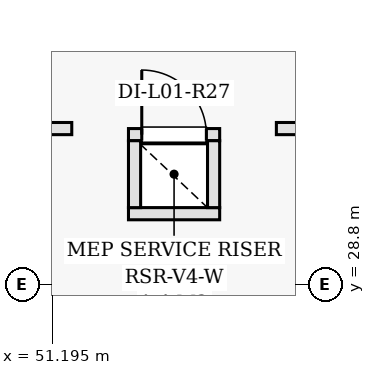
"""IFC4 building model, lengths in metres.
Left out: names, types, materials, properties, quantities, classifications, styles, units other than length and angle.
Written with IfcOpenShell. Run it as: python <this file> out.ifc"""

import sys

from ifc_helpers import new_model, si_unit, direction, frame, frame_2d, origin, place, context, subcontext, project, spatial, rectangle, extrude, element, fill, save


model = new_model("IFC4")
c1 = context("Model", 3, precision=1e-05, world=origin(), true_north=direction((0.0, 1.0)))
c2 = subcontext(c1, "Body", "Model", "MODEL_VIEW")
j1 = project(units=[si_unit("LENGTHUNIT", "METRE"), si_unit("PLANEANGLEUNIT", "RADIAN")], contexts=[c1])
p1 = place(None, origin())
s1 = spatial("IfcSite", under=j1, at=p1, CompositionType="ELEMENT")
p2 = place(p1, origin())
s2 = spatial("IfcBuilding", under=s1, at=p2, CompositionType="ELEMENT")
p3 = place(p2, frame((0.0, 0.0, 4.8)))
s3 = spatial("IfcBuildingStorey", under=s2, at=p3, CompositionType="ELEMENT", Elevation=4.8)
p4 = place(p3, frame((52.2, 29.73, 0.0), z_axis=(0.0, 0.0, 1.0), x_axis=(1.0, 0.0, 0.0)))
e1 = element("IfcWall", 1, at=p4, inside=s3, PredefinedType="PARTITIONING", context=c2, shape_type="SweptSolid", body=[
    extrude(rectangle(XDim=1.2, YDim=0.16, at=frame_2d((0.6, 0.0))), origin(), (0.0, 0.0, 1.0), 4.58),
])
p5 = place(p3, frame((52.2, 30.77, 0.0), z_axis=(0.0, 0.0, 1.0), x_axis=(1.0, 0.0, 0.0)))
e2 = element("IfcWall", 2, at=p5, inside=s3, PredefinedType="PARTITIONING", context=c2, shape_type="SweptSolid", body=[
    extrude(rectangle(XDim=1.2, YDim=0.16, at=frame_2d((0.6, 0.0))), origin(), (0.0, 0.0, 1.0), 4.58),
])
p6 = place(p5, frame((0.175, 0.0, 0.0)))
e3 = element("IfcOpeningElement", 3, at=p6, cuts=e2, PredefinedType="OPENING", context=c2, shape_type="SweptSolid", body=[
    extrude(rectangle(XDim=0.85, YDim=2.02, at=frame_2d((0.425, 1.01))), frame((0.0, 0.09, 0.0), z_axis=(0.0, -1.0, 0.0), x_axis=(1.0, 0.0, 0.0)), (0.0, 0.0, 1.0), 0.18),
])
for number, where, z_axis, x_axis in (
    (4, (52.28, 29.81, 0.0), (0.0, 0.0, 1.0), (0.0, 1.0, 0.0)),
    (5, (53.32, 29.81, 0.0), (0.0, 0.0, 1.0), (0.0, 1.0, 0.0)),
):
    element("IfcWall", number, at=place(p3, frame(where, z_axis=z_axis, x_axis=x_axis)), inside=s3, PredefinedType="PARTITIONING", context=c2, shape_type="SweptSolid", body=[
        extrude(rectangle(XDim=0.88, YDim=0.16, at=frame_2d((0.44, 0.0))), origin(), (0.0, 0.0, 1.0), 4.58),
    ])
p7 = place(p3, frame((54.146, 30.85, 0.0), z_axis=(0.0, 0.0, 1.0), x_axis=(1.0, 0.0, 0.0)))
e6 = element("IfcWall", 6, at=p7, inside=s3, PredefinedType="PARTITIONING", context=c2, shape_type="SweptSolid", body=[
    extrude(rectangle(XDim=3.313, YDim=0.16, at=frame_2d((1.656, 0.0))), origin(), (0.0, 0.0, 1.0), 4.48),
])
p8 = place(p7, frame((1.107, 0.0, 0.0)))
e7 = element("IfcOpeningElement", 7, at=p8, cuts=e6, PredefinedType="OPENING", context=c2, shape_type="SweptSolid", body=[
    extrude(rectangle(XDim=1.1, YDim=2.15, at=frame_2d((0.55, 1.075))), frame((0.0, 0.09, 0.0), z_axis=(0.0, -1.0, 0.0), x_axis=(1.0, 0.0, 0.0)), (0.0, 0.0, 1.0), 0.18),
])
p9 = place(p3, frame((48.905, 30.85, 0.0), z_axis=(0.0, 0.0, 1.0), x_axis=(1.0, 0.0, 0.0)))
e8 = element("IfcWall", 8, at=p9, inside=s3, PredefinedType="PARTITIONING", context=c2, shape_type="SweptSolid", body=[
    extrude(rectangle(XDim=2.549, YDim=0.16, at=frame_2d((1.274, 0.0))), origin(), (0.0, 0.0, 1.0), 4.48),
])
p10 = place(p6, origin())
e9 = element("IfcDoor", 9, at=p10, inside=s3, OperationType="SINGLE_SWING_LEFT", PredefinedType="DOOR", context=c2, shape_type="SweptSolid", body=[
    extrude(rectangle(XDim=0.85, YDim=2.02, at=frame_2d((0.425, 1.01))), frame((0.0, 0.025, 0.0), z_axis=(0.0, -1.0, 0.0), x_axis=(1.0, 0.0, 0.0)), (0.0, 0.0, 1.0), 0.05),
])
fill(e3, e9)
save(model, sys.argv[1])
